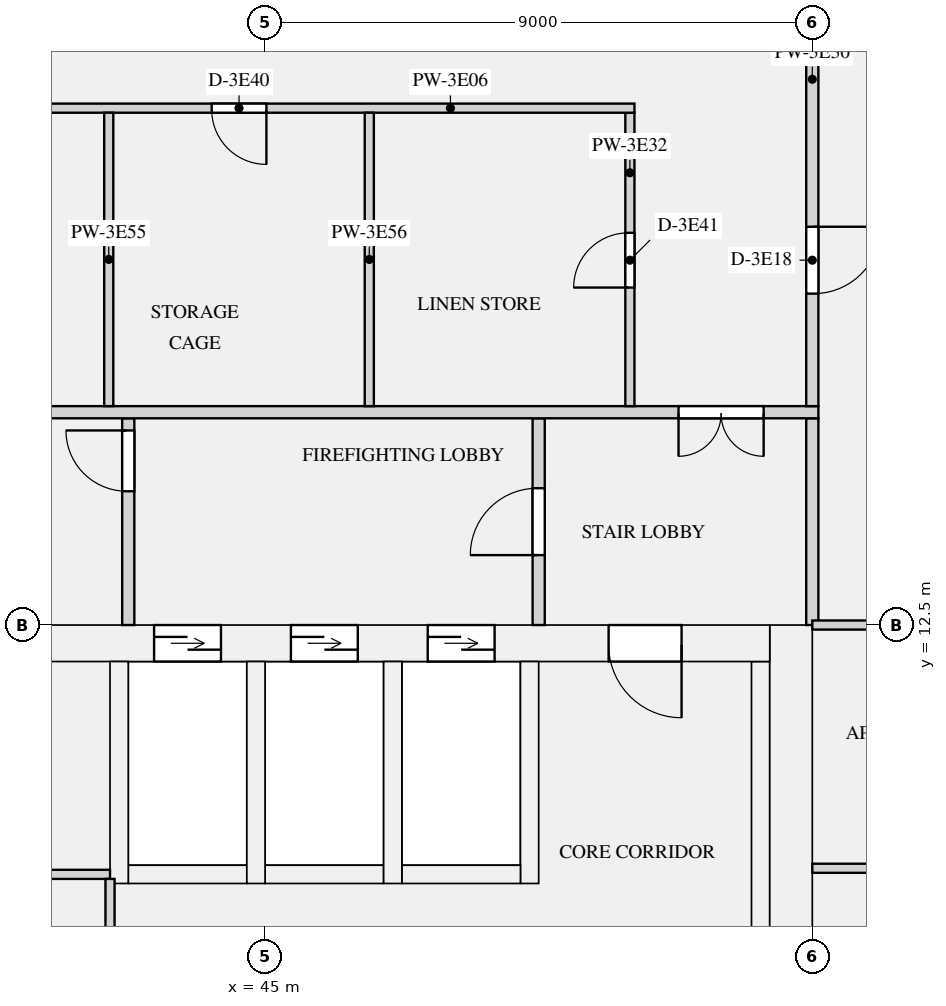
"""IFC4 building model, lengths in metres.
Left out: names, types, materials, properties, quantities, classifications, styles, units other than length and angle.
Written with IfcOpenShell. Run it as: python <this file> out.ifc"""

import sys

from ifc_helpers import new_model, si_unit, direction, frame, frame_2d, origin, place, context, subcontext, project, spatial, rectangle, extrude, element, fill, save


model = new_model("IFC4")
c1 = context("Model", 3, precision=1e-05, world=origin(), true_north=direction((0.0, 1.0)))
c2 = subcontext(c1, "Body", "Model", "MODEL_VIEW")
j1 = project(units=[si_unit("LENGTHUNIT", "METRE"), si_unit("PLANEANGLEUNIT", "RADIAN")], contexts=[c1])
p1 = place(None, origin())
s1 = spatial("IfcSite", under=j1, at=p1, CompositionType="ELEMENT")
p2 = place(p1, origin())
s2 = spatial("IfcBuilding", under=s1, at=p2, CompositionType="ELEMENT")
p3 = place(p2, frame((0.0, 0.0, 172.8)))
s3 = spatial("IfcBuildingStorey", under=s2, at=p3, CompositionType="ELEMENT", Elevation=172.8)
p4 = place(p3, frame((53.65, 0.0, 0.0), z_axis=(0.0, 0.0, 1.0), x_axis=(0.0, 1.0, 0.0)))
e1 = element("IfcWall", 1, at=p4, inside=s3, PredefinedType="SHEAR", context=c2, shape_type="SweptSolid", body=[
    extrude(rectangle(XDim=12.5, YDim=0.7, at=frame_2d((6.25, 0.0))), origin(), (0.0, 0.0, 1.0), 3.15),
])
p5 = place(p3, frame((18.7, 12.2, 0.0), z_axis=(0.0, 0.0, 1.0), x_axis=(1.0, 0.0, 0.0)))
e2 = element("IfcWall", 2, at=p5, inside=s3, PredefinedType="SHEAR", context=c2, shape_type="SweptSolid", body=[
    extrude(rectangle(XDim=34.6, YDim=0.6, at=frame_2d((17.3, 0.0))), origin(), (0.0, 0.0, 1.0), 3.15),
])
p6 = place(p5, frame((24.475, 0.0, 0.0)))
e3 = element("IfcOpeningElement", 3, at=p6, cuts=e2, PredefinedType="OPENING", context=c2, shape_type="SweptSolid", body=[
    extrude(rectangle(XDim=1.1, YDim=2.1, at=frame_2d((0.55, 1.05))), frame((0.0, 0.31, 0.0), z_axis=(0.0, -1.0, 0.0), x_axis=(1.0, 0.0, 0.0)), (0.0, 0.0, 1.0), 0.62),
])
p7 = place(p5, frame((26.725, 0.0, 0.0)))
e4 = element("IfcOpeningElement", 4, at=p7, cuts=e2, PredefinedType="OPENING", context=c2, shape_type="SweptSolid", body=[
    extrude(rectangle(XDim=1.1, YDim=2.1, at=frame_2d((0.55, 1.05))), frame((0.0, 0.31, 0.0), z_axis=(0.0, -1.0, 0.0), x_axis=(1.0, 0.0, 0.0)), (0.0, 0.0, 1.0), 0.62),
])
p8 = place(p5, frame((28.975, 0.0, 0.0)))
e5 = element("IfcOpeningElement", 5, at=p8, cuts=e2, PredefinedType="OPENING", context=c2, shape_type="SweptSolid", body=[
    extrude(rectangle(XDim=1.1, YDim=2.1, at=frame_2d((0.55, 1.05))), frame((0.0, 0.31, 0.0), z_axis=(0.0, -1.0, 0.0), x_axis=(1.0, 0.0, 0.0)), (0.0, 0.0, 1.0), 0.62),
])
p9 = place(p5, frame((11.85, 0.0, 0.0)))
e6 = element("IfcOpeningElement", 6, at=p9, cuts=e2, PredefinedType="OPENING", context=c2, shape_type="SweptSolid", body=[
    extrude(rectangle(XDim=0.9, YDim=2.1, at=frame_2d((0.45, 1.05))), frame((0.0, 0.31, 0.0), z_axis=(0.0, -1.0, 0.0), x_axis=(1.0, 0.0, 0.0)), (0.0, 0.0, 1.0), 0.62),
])
p10 = place(p5, frame((18.35, 0.0, 0.0)))
e7 = element("IfcOpeningElement", 7, at=p10, cuts=e2, PredefinedType="OPENING", context=c2, shape_type="SweptSolid", body=[
    extrude(rectangle(XDim=0.9, YDim=2.1, at=frame_2d((0.45, 1.05))), frame((0.0, 0.31, 0.0), z_axis=(0.0, -1.0, 0.0), x_axis=(1.0, 0.0, 0.0)), (0.0, 0.0, 1.0), 0.62),
])
p11 = place(p5, frame((1.45, 0.0, 0.0)))
e8 = element("IfcOpeningElement", 8, at=p11, cuts=e2, PredefinedType="OPENING", context=c2, shape_type="SweptSolid", body=[
    extrude(rectangle(XDim=1.2, YDim=2.1, at=frame_2d((0.6, 1.05))), frame((0.0, 0.31, 0.0), z_axis=(0.0, -1.0, 0.0), x_axis=(1.0, 0.0, 0.0)), (0.0, 0.0, 1.0), 0.62),
])
p12 = place(p5, frame((31.95, 0.0, 0.0)))
e9 = element("IfcOpeningElement", 9, at=p12, cuts=e2, PredefinedType="OPENING", context=c2, shape_type="SweptSolid", body=[
    extrude(rectangle(XDim=1.2, YDim=2.1, at=frame_2d((0.6, 1.05))), frame((0.0, 0.31, 0.0), z_axis=(0.0, -1.0, 0.0), x_axis=(1.0, 0.0, 0.0)), (0.0, 0.0, 1.0), 0.62),
])
p13 = place(p3, frame((53.15, 1.0, 0.0), z_axis=(0.0, 0.0, 1.0), x_axis=(0.0, 1.0, 0.0)))
e10 = element("IfcWall", 10, at=p13, inside=s3, PredefinedType="SHEAR", context=c2, shape_type="SweptSolid", body=[
    extrude(rectangle(XDim=10.9, YDim=0.3, at=frame_2d((5.45, 0.0))), origin(), (0.0, 0.0, 1.0), 3.15),
])
p14 = place(p3, frame((42.75, 8.4, 0.0), z_axis=(0.0, 0.0, 1.0), x_axis=(1.0, 0.0, 0.0)))
e11 = element("IfcWall", 11, at=p14, inside=s3, PredefinedType="SHEAR", context=c2, shape_type="SweptSolid", body=[
    extrude(rectangle(XDim=1.95, YDim=0.3, at=frame_2d((0.975, 0.0))), origin(), (0.0, 0.0, 1.0), 3.15),
])
p15 = place(p3, frame((42.6, 8.25, 0.0), z_axis=(0.0, 0.0, 1.0), x_axis=(0.0, 1.0, 0.0)))
e12 = element("IfcWall", 12, at=p15, inside=s3, PredefinedType="SHEAR", context=c2, shape_type="SweptSolid", body=[
    extrude(rectangle(XDim=3.65, YDim=0.3, at=frame_2d((1.825, 0.0))), origin(), (0.0, 0.0, 1.0), 3.15),
])
p16 = place(p3, frame((45.0, 8.4, 0.0), z_axis=(0.0, 0.0, 1.0), x_axis=(1.0, 0.0, 0.0)))
e13 = element("IfcWall", 13, at=p16, inside=s3, PredefinedType="SHEAR", context=c2, shape_type="SweptSolid", body=[
    extrude(rectangle(XDim=1.95, YDim=0.3, at=frame_2d((0.975, 0.0))), origin(), (0.0, 0.0, 1.0), 3.15),
])
p17 = place(p3, frame((44.85, 8.25, 0.0), z_axis=(0.0, 0.0, 1.0), x_axis=(0.0, 1.0, 0.0)))
e14 = element("IfcWall", 14, at=p17, inside=s3, PredefinedType="SHEAR", context=c2, shape_type="SweptSolid", body=[
    extrude(rectangle(XDim=3.65, YDim=0.3, at=frame_2d((1.825, 0.0))), origin(), (0.0, 0.0, 1.0), 3.15),
])
p18 = place(p3, frame((47.25, 8.4, 0.0), z_axis=(0.0, 0.0, 1.0), x_axis=(1.0, 0.0, 0.0)))
e15 = element("IfcWall", 15, at=p18, inside=s3, PredefinedType="SHEAR", context=c2, shape_type="SweptSolid", body=[
    extrude(rectangle(XDim=1.95, YDim=0.3, at=frame_2d((0.975, 0.0))), origin(), (0.0, 0.0, 1.0), 3.15),
])
for number, where, z_axis, x_axis in (
    (16, (47.1, 8.25, 0.0), (0.0, 0.0, 1.0), (0.0, 1.0, 0.0)),
    (17, (49.35, 8.25, 0.0), (0.0, 0.0, 1.0), (0.0, 1.0, 0.0)),
):
    element("IfcWall", number, at=place(p3, frame(where, z_axis=z_axis, x_axis=x_axis)), inside=s3, PredefinedType="SHEAR", context=c2, shape_type="SweptSolid", body=[
        extrude(rectangle(XDim=3.65, YDim=0.3, at=frame_2d((1.825, 0.0))), origin(), (0.0, 0.0, 1.0), 3.15),
    ])
p19 = place(p3, frame((36.675, 8.4, 0.0), z_axis=(0.0, 0.0, 1.0), x_axis=(1.0, 0.0, 0.0)))
e18 = element("IfcWall", 18, at=p19, inside=s3, PredefinedType="PARTITIONING", context=c2, shape_type="SweptSolid", body=[
    extrude(rectangle(XDim=5.775, YDim=0.15, at=frame_2d((2.887, 0.0))), origin(), (0.0, 0.0, 1.0), 2.83),
])
p20 = place(p3, frame((42.45, 6.65, 0.0), z_axis=(0.0, 0.0, 1.0), x_axis=(0.0, 1.0, 0.0)))
e19 = element("IfcWall", 19, at=p20, inside=s3, PredefinedType="PARTITIONING", context=c2, shape_type="SweptSolid", body=[
    extrude(rectangle(XDim=1.675, YDim=0.15, at=frame_2d((0.837, 0.0))), origin(), (0.0, 0.0, 1.0), 2.83),
])
p21 = place(p3, frame((42.75, 12.5, 0.0), z_axis=(0.0, 0.0, 1.0), x_axis=(0.0, 1.0, 0.0)))
e20 = element("IfcWall", 20, at=p21, inside=s3, PredefinedType="PARTITIONING", context=c2, shape_type="SweptSolid", body=[
    extrude(rectangle(XDim=3.4, YDim=0.2, at=frame_2d((1.7, 0.0))), origin(), (0.0, 0.0, 1.0), 2.83),
])
p22 = place(p21, frame((2.2, 0.0, 0.0)))
e21 = element("IfcOpeningElement", 21, at=p22, cuts=e20, PredefinedType="OPENING", context=c2, shape_type="SweptSolid", body=[
    extrude(rectangle(XDim=1.0, YDim=2.1, at=frame_2d((0.5, 1.05))), frame((0.0, 0.11, 0.0), z_axis=(0.0, -1.0, 0.0), x_axis=(1.0, 0.0, 0.0)), (0.0, 0.0, 1.0), 0.22),
])
p23 = place(p3, frame((49.5, 12.5, 0.0), z_axis=(0.0, 0.0, 1.0), x_axis=(0.0, 1.0, 0.0)))
e22 = element("IfcWall", 22, at=p23, inside=s3, PredefinedType="PARTITIONING", context=c2, shape_type="SweptSolid", body=[
    extrude(rectangle(XDim=3.4, YDim=0.2, at=frame_2d((1.7, 0.0))), origin(), (0.0, 0.0, 1.0), 2.83),
])
p24 = place(p23, frame((1.15, 0.0, 0.0)))
e23 = element("IfcOpeningElement", 23, at=p24, cuts=e22, PredefinedType="OPENING", context=c2, shape_type="SweptSolid", body=[
    extrude(rectangle(XDim=1.1, YDim=2.1, at=frame_2d((0.55, 1.05))), frame((0.0, 0.11, 0.0), z_axis=(0.0, -1.0, 0.0), x_axis=(1.0, 0.0, 0.0)), (0.0, 0.0, 1.0), 0.22),
])
p25 = place(p3, frame((54.0, 12.5, 0.0), z_axis=(0.0, 0.0, 1.0), x_axis=(0.0, 1.0, 0.0)))
e24 = element("IfcWall", 24, at=p25, inside=s3, PredefinedType="PARTITIONING", context=c2, shape_type="SweptSolid", body=[
    extrude(rectangle(XDim=3.4, YDim=0.2, at=frame_2d((1.7, 0.0))), origin(), (0.0, 0.0, 1.0), 2.83),
])
p26 = place(p3, frame((20.925, 21.0, 0.0), z_axis=(0.0, 0.0, 1.0), x_axis=(1.0, 0.0, 0.0)))
e25 = element("IfcWall", 25, at=p26, inside=s3, PredefinedType="PARTITIONING", context=c2, shape_type="SweptSolid", body=[
    extrude(rectangle(XDim=30.15, YDim=0.15, at=frame_2d((15.075, 0.0))), origin(), (0.0, 0.0, 1.0), 2.83),
])
p27 = place(p26, frame((6.053, 0.0, 0.0)))
e26 = element("IfcOpeningElement", 26, at=p27, cuts=e25, PredefinedType="OPENING", context=c2, shape_type="SweptSolid", body=[
    extrude(rectangle(XDim=0.9, YDim=2.1, at=frame_2d((0.45, 1.05))), frame((0.0, 0.085, 0.0), z_axis=(0.0, -1.0, 0.0), x_axis=(1.0, 0.0, 0.0)), (0.0, 0.0, 1.0), 0.17),
])
p28 = place(p26, frame((10.339, 0.0, 0.0)))
e27 = element("IfcOpeningElement", 27, at=p28, cuts=e25, PredefinedType="OPENING", context=c2, shape_type="SweptSolid", body=[
    extrude(rectangle(XDim=0.9, YDim=2.1, at=frame_2d((0.45, 1.05))), frame((0.0, 0.085, 0.0), z_axis=(0.0, -1.0, 0.0), x_axis=(1.0, 0.0, 0.0)), (0.0, 0.0, 1.0), 0.17),
])
p29 = place(p26, frame((14.625, 0.0, 0.0)))
e28 = element("IfcOpeningElement", 28, at=p29, cuts=e25, PredefinedType="OPENING", context=c2, shape_type="SweptSolid", body=[
    extrude(rectangle(XDim=0.9, YDim=2.1, at=frame_2d((0.45, 1.05))), frame((0.0, 0.085, 0.0), z_axis=(0.0, -1.0, 0.0), x_axis=(1.0, 0.0, 0.0)), (0.0, 0.0, 1.0), 0.17),
])
p30 = place(p26, frame((18.911, 0.0, 0.0)))
e29 = element("IfcOpeningElement", 29, at=p30, cuts=e25, PredefinedType="OPENING", context=c2, shape_type="SweptSolid", body=[
    extrude(rectangle(XDim=0.9, YDim=2.1, at=frame_2d((0.45, 1.05))), frame((0.0, 0.085, 0.0), z_axis=(0.0, -1.0, 0.0), x_axis=(1.0, 0.0, 0.0)), (0.0, 0.0, 1.0), 0.17),
])
p31 = place(p26, frame((23.197, 0.0, 0.0)))
e30 = element("IfcOpeningElement", 30, at=p31, cuts=e25, PredefinedType="OPENING", context=c2, shape_type="SweptSolid", body=[
    extrude(rectangle(XDim=0.9, YDim=2.1, at=frame_2d((0.45, 1.05))), frame((0.0, 0.085, 0.0), z_axis=(0.0, -1.0, 0.0), x_axis=(1.0, 0.0, 0.0)), (0.0, 0.0, 1.0), 0.17),
])
p32 = place(p3, frame((54.0, 8.5, 0.0), z_axis=(0.0, 0.0, 1.0), x_axis=(1.0, 0.0, 0.0)))
e31 = element("IfcWall", 31, at=p32, inside=s3, PredefinedType="PARTITIONING", context=c2, shape_type="SweptSolid", body=[
    extrude(rectangle(XDim=17.3, YDim=0.15, at=frame_2d((8.65, 0.0))), origin(), (0.0, 0.0, 1.0), 2.83),
])
p33 = place(p32, frame((1.8, 0.0, 0.0)))
e32 = element("IfcOpeningElement", 32, at=p33, cuts=e31, PredefinedType="OPENING", context=c2, shape_type="SweptSolid", body=[
    extrude(rectangle(XDim=0.9, YDim=2.1, at=frame_2d((0.45, 1.05))), frame((0.0, 0.085, 0.0), z_axis=(0.0, -1.0, 0.0), x_axis=(1.0, 0.0, 0.0)), (0.0, 0.0, 1.0), 0.17),
])
p34 = place(p32, frame((6.3, 0.0, 0.0)))
e33 = element("IfcOpeningElement", 33, at=p34, cuts=e31, PredefinedType="OPENING", context=c2, shape_type="SweptSolid", body=[
    extrude(rectangle(XDim=0.9, YDim=2.1, at=frame_2d((0.45, 1.05))), frame((0.0, 0.085, 0.0), z_axis=(0.0, -1.0, 0.0), x_axis=(1.0, 0.0, 0.0)), (0.0, 0.0, 1.0), 0.17),
])
p35 = place(p32, frame((10.8, 0.0, 0.0)))
e34 = element("IfcOpeningElement", 34, at=p35, cuts=e31, PredefinedType="OPENING", context=c2, shape_type="SweptSolid", body=[
    extrude(rectangle(XDim=0.9, YDim=2.1, at=frame_2d((0.45, 1.05))), frame((0.0, 0.085, 0.0), z_axis=(0.0, -1.0, 0.0), x_axis=(1.0, 0.0, 0.0)), (0.0, 0.0, 1.0), 0.17),
])
p36 = place(p32, frame((15.025, 0.0, 0.0)))
e35 = element("IfcOpeningElement", 35, at=p36, cuts=e31, PredefinedType="OPENING", context=c2, shape_type="SweptSolid", body=[
    extrude(rectangle(XDim=0.9, YDim=2.1, at=frame_2d((0.45, 1.05))), frame((0.0, 0.085, 0.0), z_axis=(0.0, -1.0, 0.0), x_axis=(1.0, 0.0, 0.0)), (0.0, 0.0, 1.0), 0.17),
])
p37 = place(p3, frame((54.0, 12.5, 0.0), z_axis=(0.0, 0.0, 1.0), x_axis=(1.0, 0.0, 0.0)))
e36 = element("IfcWall", 36, at=p37, inside=s3, PredefinedType="PARTITIONING", context=c2, shape_type="SweptSolid", body=[
    extrude(rectangle(XDim=17.3, YDim=0.15, at=frame_2d((8.65, 0.0))), origin(), (0.0, 0.0, 1.0), 2.83),
])
p38 = place(p37, frame((1.5, 0.0, 0.0)))
e37 = element("IfcOpeningElement", 37, at=p38, cuts=e36, PredefinedType="OPENING", context=c2, shape_type="SweptSolid", body=[
    extrude(rectangle(XDim=1.5, YDim=2.1, at=frame_2d((0.75, 1.05))), frame((0.0, 0.085, 0.0), z_axis=(0.0, -1.0, 0.0), x_axis=(1.0, 0.0, 0.0)), (0.0, 0.0, 1.0), 0.17),
])
p39 = place(p37, frame((7.05, 0.0, 0.0)))
e38 = element("IfcOpeningElement", 38, at=p39, cuts=e36, PredefinedType="OPENING", context=c2, shape_type="SweptSolid", body=[
    extrude(rectangle(XDim=0.9, YDim=2.1, at=frame_2d((0.45, 1.05))), frame((0.0, 0.085, 0.0), z_axis=(0.0, -1.0, 0.0), x_axis=(1.0, 0.0, 0.0)), (0.0, 0.0, 1.0), 0.17),
])
p40 = place(p37, frame((12.75, 0.0, 0.0)))
e39 = element("IfcOpeningElement", 39, at=p40, cuts=e36, PredefinedType="OPENING", context=c2, shape_type="SweptSolid", body=[
    extrude(rectangle(XDim=1.5, YDim=2.1, at=frame_2d((0.75, 1.05))), frame((0.0, 0.085, 0.0), z_axis=(0.0, -1.0, 0.0), x_axis=(1.0, 0.0, 0.0)), (0.0, 0.0, 1.0), 0.17),
])
p41 = place(p3, frame((17.9, 16.0, 0.0), z_axis=(0.0, 0.0, 1.0), x_axis=(1.0, 0.0, 0.0)))
e40 = element("IfcWall", 40, at=p41, inside=s3, PredefinedType="PARTITIONING", context=c2, shape_type="SweptSolid", body=[
    extrude(rectangle(XDim=36.2, YDim=0.2, at=frame_2d((18.1, 0.0))), origin(), (0.0, 0.0, 1.0), 2.83),
])
p42 = place(p41, frame((0.9, 0.0, 0.0)))
e41 = element("IfcOpeningElement", 41, at=p42, cuts=e40, PredefinedType="OPENING", context=c2, shape_type="SweptSolid", body=[
    extrude(rectangle(XDim=1.4, YDim=2.1, at=frame_2d((0.7, 1.05))), frame((0.0, 0.11, 0.0), z_axis=(0.0, -1.0, 0.0), x_axis=(1.0, 0.0, 0.0)), (0.0, 0.0, 1.0), 0.22),
])
p43 = place(p41, frame((33.9, 0.0, 0.0)))
e42 = element("IfcOpeningElement", 42, at=p43, cuts=e40, PredefinedType="OPENING", context=c2, shape_type="SweptSolid", body=[
    extrude(rectangle(XDim=1.4, YDim=2.1, at=frame_2d((0.7, 1.05))), frame((0.0, 0.11, 0.0), z_axis=(0.0, -1.0, 0.0), x_axis=(1.0, 0.0, 0.0)), (0.0, 0.0, 1.0), 0.22),
])
p44 = place(p3, frame((54.0, 16.1, 0.0), z_axis=(0.0, 0.0, 1.0), x_axis=(0.0, 1.0, 0.0)))
e43 = element("IfcWall", 43, at=p44, inside=s3, PredefinedType="PARTITIONING", context=c2, shape_type="SweptSolid", body=[
    extrude(rectangle(XDim=7.8, YDim=0.2, at=frame_2d((3.9, 0.0))), origin(), (0.0, 0.0, 1.0), 2.83),
])
p45 = place(p44, frame((1.85, 0.0, 0.0)))
e44 = element("IfcOpeningElement", 44, at=p45, cuts=e43, PredefinedType="OPENING", context=c2, shape_type="SweptSolid", body=[
    extrude(rectangle(XDim=1.1, YDim=2.1, at=frame_2d((0.55, 1.05))), frame((0.0, 0.11, 0.0), z_axis=(0.0, -1.0, 0.0), x_axis=(1.0, 0.0, 0.0)), (0.0, 0.0, 1.0), 0.22),
])
p46 = place(p3, frame((51.0, 16.1, 0.0), z_axis=(0.0, 0.0, 1.0), x_axis=(0.0, 1.0, 0.0)))
e45 = element("IfcWall", 45, at=p46, inside=s3, PredefinedType="PARTITIONING", context=c2, shape_type="SweptSolid", body=[
    extrude(rectangle(XDim=4.825, YDim=0.15, at=frame_2d((2.413, 0.0))), origin(), (0.0, 0.0, 1.0), 2.83),
])
p47 = place(p46, frame((1.95, 0.0, 0.0)))
e46 = element("IfcOpeningElement", 46, at=p47, cuts=e45, PredefinedType="OPENING", context=c2, shape_type="SweptSolid", body=[
    extrude(rectangle(XDim=0.9, YDim=2.1, at=frame_2d((0.45, 1.05))), frame((0.0, 0.085, 0.0), z_axis=(0.0, -1.0, 0.0), x_axis=(1.0, 0.0, 0.0)), (0.0, 0.0, 1.0), 0.17),
])
for number, where, z_axis, x_axis in (
    (47, (42.429, 16.1, 0.0), (0.0, 0.0, 1.0), (0.0, 1.0, 0.0)),
    (48, (46.714, 16.1, 0.0), (0.0, 0.0, 1.0), (0.0, 1.0, 0.0)),
):
    element("IfcWall", number, at=place(p3, frame(where, z_axis=z_axis, x_axis=x_axis)), inside=s3, PredefinedType="PARTITIONING", context=c2, shape_type="SweptSolid", body=[
        extrude(rectangle(XDim=4.825, YDim=0.15, at=frame_2d((2.413, 0.0))), origin(), (0.0, 0.0, 1.0), 2.83),
    ])
p48 = place(p6, origin())
e49 = element("IfcDoor", 49, at=p48, inside=s3, OperationType="DOUBLE_DOOR_SLIDING", PredefinedType="DOOR", context=c2, shape_type="SweptSolid", body=[
    extrude(rectangle(XDim=1.1, YDim=2.1, at=frame_2d((0.55, 1.05))), frame((0.0, 0.025, 0.0), z_axis=(0.0, -1.0, 0.0), x_axis=(1.0, 0.0, 0.0)), (0.0, 0.0, 1.0), 0.05),
])
fill(e3, e49)
p49 = place(p7, origin())
e50 = element("IfcDoor", 50, at=p49, inside=s3, OperationType="DOUBLE_DOOR_SLIDING", PredefinedType="DOOR", context=c2, shape_type="SweptSolid", body=[
    extrude(rectangle(XDim=1.1, YDim=2.1, at=frame_2d((0.55, 1.05))), frame((0.0, 0.025, 0.0), z_axis=(0.0, -1.0, 0.0), x_axis=(1.0, 0.0, 0.0)), (0.0, 0.0, 1.0), 0.05),
])
fill(e4, e50)
p50 = place(p8, origin())
e51 = element("IfcDoor", 51, at=p50, inside=s3, OperationType="DOUBLE_DOOR_SLIDING", PredefinedType="DOOR", context=c2, shape_type="SweptSolid", body=[
    extrude(rectangle(XDim=1.1, YDim=2.1, at=frame_2d((0.55, 1.05))), frame((0.0, 0.025, 0.0), z_axis=(0.0, -1.0, 0.0), x_axis=(1.0, 0.0, 0.0)), (0.0, 0.0, 1.0), 0.05),
])
fill(e5, e51)
p51 = place(p12, frame((1.2, 0.0, 0.0), z_axis=(0.0, 0.0, 1.0), x_axis=(-1.0, 0.0, 0.0)))
e52 = element("IfcDoor", 52, at=p51, inside=s3, OperationType="SINGLE_SWING_LEFT", PredefinedType="DOOR", context=c2, shape_type="SweptSolid", body=[
    extrude(rectangle(XDim=1.2, YDim=2.1, at=frame_2d((0.6, 1.05))), frame((0.0, 0.025, 0.0), z_axis=(0.0, -1.0, 0.0), x_axis=(1.0, 0.0, 0.0)), (0.0, 0.0, 1.0), 0.05),
])
fill(e9, e52)
p52 = place(p22, origin())
e53 = element("IfcDoor", 53, at=p52, inside=s3, OperationType="SINGLE_SWING_RIGHT", PredefinedType="DOOR", context=c2, shape_type="SweptSolid", body=[
    extrude(rectangle(XDim=1.0, YDim=2.1, at=frame_2d((0.5, 1.05))), frame((0.0, 0.025, 0.0), z_axis=(0.0, -1.0, 0.0), x_axis=(1.0, 0.0, 0.0)), (0.0, 0.0, 1.0), 0.05),
])
fill(e21, e53)
p53 = place(p24, origin())
e54 = element("IfcDoor", 54, at=p53, inside=s3, OperationType="SINGLE_SWING_LEFT", PredefinedType="DOOR", context=c2, shape_type="SweptSolid", body=[
    extrude(rectangle(XDim=1.1, YDim=2.1, at=frame_2d((0.55, 1.05))), frame((0.0, 0.025, 0.0), z_axis=(0.0, -1.0, 0.0), x_axis=(1.0, 0.0, 0.0)), (0.0, 0.0, 1.0), 0.05),
])
fill(e23, e54)
p54 = place(p43, frame((1.4, 0.0, 0.0), z_axis=(0.0, 0.0, 1.0), x_axis=(-1.0, 0.0, 0.0)))
e55 = element("IfcDoor", 55, at=p54, inside=s3, OperationType="DOUBLE_DOOR_SINGLE_SWING", PredefinedType="DOOR", context=c2, shape_type="SweptSolid", body=[
    extrude(rectangle(XDim=1.4, YDim=2.1, at=frame_2d((0.7, 1.05))), frame((0.0, 0.025, 0.0), z_axis=(0.0, -1.0, 0.0), x_axis=(1.0, 0.0, 0.0)), (0.0, 0.0, 1.0), 0.05),
])
fill(e42, e55)
p55 = place(p45, frame((1.1, 0.0, 0.0), z_axis=(0.0, 0.0, 1.0), x_axis=(-1.0, 0.0, 0.0)))
e56 = element("IfcDoor", 56, at=p55, inside=s3, OperationType="SINGLE_SWING_LEFT", PredefinedType="DOOR", context=c2, shape_type="SweptSolid", body=[
    extrude(rectangle(XDim=1.1, YDim=2.1, at=frame_2d((0.55, 1.05))), frame((0.0, 0.025, 0.0), z_axis=(0.0, -1.0, 0.0), x_axis=(1.0, 0.0, 0.0)), (0.0, 0.0, 1.0), 0.05),
])
fill(e44, e56)
p56 = place(p31, frame((0.9, 0.0, 0.0), z_axis=(0.0, 0.0, 1.0), x_axis=(-1.0, 0.0, 0.0)))
e57 = element("IfcDoor", 57, at=p56, inside=s3, OperationType="SINGLE_SWING_LEFT", PredefinedType="DOOR", context=c2, shape_type="SweptSolid", body=[
    extrude(rectangle(XDim=0.9, YDim=2.1, at=frame_2d((0.45, 1.05))), frame((0.0, 0.025, 0.0), z_axis=(0.0, -1.0, 0.0), x_axis=(1.0, 0.0, 0.0)), (0.0, 0.0, 1.0), 0.05),
])
fill(e30, e57)
p57 = place(p47, origin())
e58 = element("IfcDoor", 58, at=p57, inside=s3, OperationType="SINGLE_SWING_LEFT", PredefinedType="DOOR", context=c2, shape_type="SweptSolid", body=[
    extrude(rectangle(XDim=0.9, YDim=2.1, at=frame_2d((0.45, 1.05))), frame((0.0, 0.025, 0.0), z_axis=(0.0, -1.0, 0.0), x_axis=(1.0, 0.0, 0.0)), (0.0, 0.0, 1.0), 0.05),
])
fill(e46, e58)
save(model, sys.argv[1])
